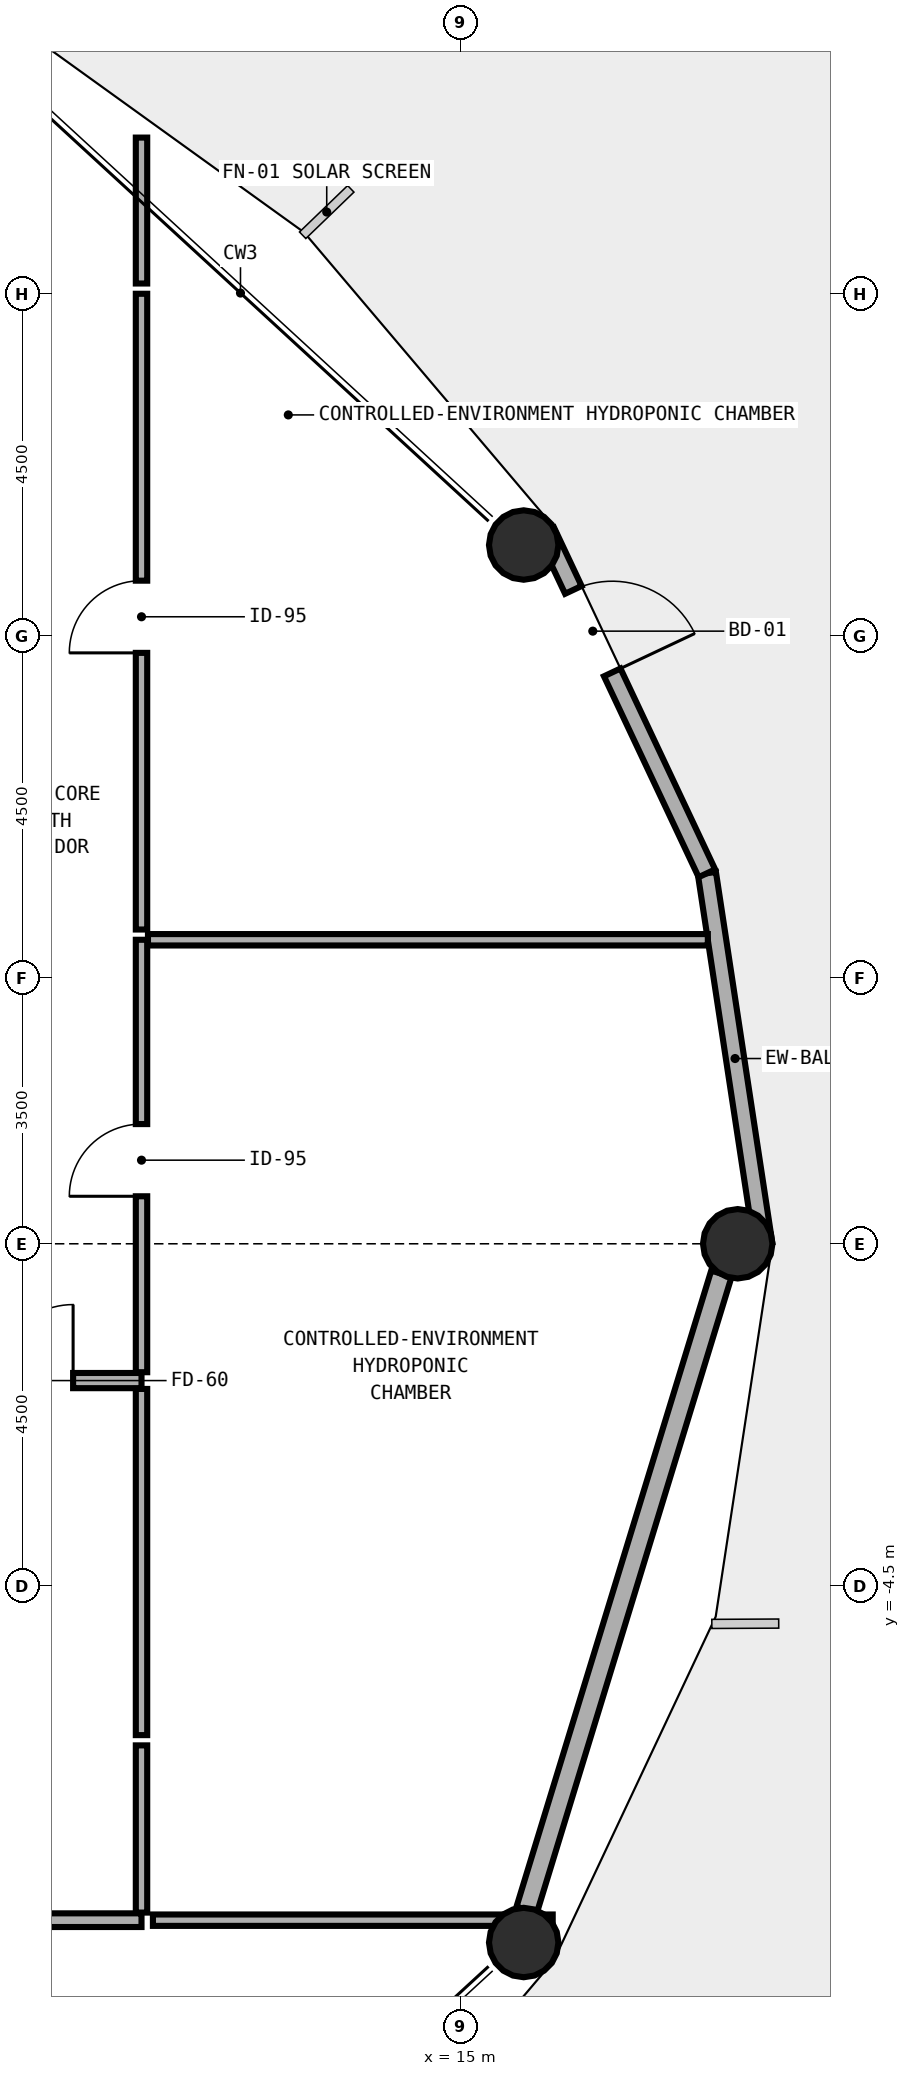
"""IFC4 building model, lengths in metres.
Left out: names, types, materials, properties, quantities, classifications, styles, units other than length and angle.
Written with IfcOpenShell. Run it as: python <this file> out.ifc"""

import sys

from ifc_helpers import new_model, si_unit, direction, frame, frame_2d, origin, origin_2d, place, context, subcontext, project, spatial, rectangle, hollow_circle, extrude, element, fill, save


model = new_model("IFC4")
c1 = context("Model", 3, precision=1e-05, world=origin(), true_north=direction((0.0, 1.0)))
c2 = subcontext(c1, "Body", "Model", "MODEL_VIEW")
j1 = project(units=[si_unit("LENGTHUNIT", "METRE"), si_unit("PLANEANGLEUNIT", "RADIAN")], contexts=[c1])
p1 = place(None, origin())
s1 = spatial("IfcSite", under=j1, at=p1, CompositionType="ELEMENT")
p2 = place(p1, origin())
s2 = spatial("IfcBuilding", under=s1, at=p2, CompositionType="ELEMENT")
p3 = place(p2, frame((0.0, 0.0, 27.6)))
s3 = spatial("IfcBuildingStorey", under=s2, at=p3, CompositionType="ELEMENT", Elevation=27.6)
p4 = place(p3, frame((18.55, 0.0, 0.0), z_axis=(0.048456117097, 0.0, 0.998825312412), x_axis=(0.0, 1.0, 0.0)))
e1 = element("IfcColumn", 1, at=p4, inside=s3, PredefinedType="COLUMN", context=c2, shape_type="SweptSolid", body=[
    extrude(hollow_circle(Radius=0.457, WallThickness=0.032, at=origin_2d()), origin(), (0.0, 0.0, 1.0), 3.88),
])
for number, where, z_axis, x_axis in (
    (2, (15.747, 9.157, 0.0), (0.042, 0.019, 0.999), (-0.409, 0.913, 0.0)),
    (3, (15.747, -9.157, 0.0), (0.042, -0.019, 0.999), (0.409, 0.913, 0.0)),
):
    element("IfcColumn", number, at=place(p3, frame(where, z_axis=z_axis, x_axis=x_axis)), inside=s3, PredefinedType="COLUMN", context=c2, shape_type="SweptSolid", body=[
        extrude(hollow_circle(Radius=0.457, WallThickness=0.032, at=origin_2d()), origin(), (0.0, 0.0, 1.0), 3.879),
    ])
p5 = place(p3, frame((18.239, 4.875, 0.0), z_axis=(0.0, 0.0, 1.0), x_axis=(0.150315759556, -0.988638039137, 0.0)))
e4 = element("IfcWall", 4, at=p5, inside=s3, PredefinedType="SOLIDWALL", context=c2, shape_type="SweptSolid", body=[
    extrude(rectangle(XDim=4.931, YDim=0.24, at=frame_2d((2.465, 0.0))), origin(), (0.0, 0.0, 1.0), 3.06),
])
p6 = place(p3, frame((16.119, 9.373, 0.0), z_axis=(0.0, 0.0, 1.0), x_axis=(0.426272299263, -0.904594896559, 0.0)))
e5 = element("IfcWall", 5, at=p6, inside=s3, PredefinedType="SOLIDWALL", context=c2, shape_type="SweptSolid", body=[
    extrude(rectangle(XDim=4.972, YDim=0.24, at=frame_2d((2.486, 0.0))), origin(), (0.0, 0.0, 1.0), 3.06),
])
p7 = place(p6, frame((0.85, 0.0, 0.0)))
e6 = element("IfcOpeningElement", 6, at=p7, cuts=e5, PredefinedType="OPENING", context=c2, shape_type="SweptSolid", body=[
    extrude(rectangle(XDim=1.2, YDim=2.2, at=frame_2d((0.6, 1.1))), frame((0.0, 0.13, 0.0), z_axis=(0.0, -1.0, 0.0), x_axis=(1.0, 0.0, 0.0)), (0.0, 0.0, 1.0), 0.26),
])
p8 = place(p3, frame((18.429, -0.394, 0.0), z_axis=(0.0, 0.0, 1.0), x_axis=(-0.292709587844, -0.956201389449, 0.0)))
e7 = element("IfcWall", 7, at=p8, inside=s3, PredefinedType="SOLIDWALL", context=c2, shape_type="SweptSolid", body=[
    extrude(rectangle(XDim=8.753, YDim=0.28, at=frame_2d((4.376, 0.0))), origin(), (0.0, 0.0, 1.0), 3.06),
])
p9 = place(p3, frame((8.16, -1.8, 0.0), z_axis=(0.0, 0.0, 1.0), x_axis=(1.0, 0.0, 0.0)))
e8 = element("IfcWall", 8, at=p9, inside=s3, PredefinedType="MOVABLE", context=c2, shape_type="SweptSolid", body=[
    extrude(rectangle(XDim=2.64, YDim=0.2, at=frame_2d((1.32, 0.0))), origin(), (0.0, 0.0, 1.0), 3.64),
])
p10 = place(p9, frame((0.74, 0.0, 0.0)))
e9 = element("IfcOpeningElement", 9, at=p10, cuts=e8, PredefinedType="OPENING", context=c2, shape_type="SweptSolid", body=[
    extrude(rectangle(XDim=1.0, YDim=2.1, at=frame_2d((0.5, 1.05))), frame((0.0, 0.11, 0.0), z_axis=(0.0, -1.0, 0.0), x_axis=(1.0, 0.0, 0.0)), (0.0, 0.0, 1.0), 0.22),
])
p11 = place(p3, frame((10.8, -1.69, 0.0), z_axis=(0.0, 0.0, 1.0), x_axis=(0.0, 1.0, 0.0)))
e10 = element("IfcWall", 10, at=p11, inside=s3, PredefinedType="PARTITIONING", context=c2, shape_type="SweptSolid", body=[
    extrude(rectangle(XDim=5.69, YDim=0.15, at=frame_2d((2.845, 0.0))), origin(), (0.0, 0.0, 1.0), 3.64),
])
p12 = place(p11, frame((2.315, 0.0, 0.0)))
e11 = element("IfcOpeningElement", 11, at=p12, cuts=e10, PredefinedType="OPENING", context=c2, shape_type="SweptSolid", body=[
    extrude(rectangle(XDim=0.95, YDim=2.1, at=frame_2d((0.475, 1.05))), frame((0.0, 0.085, 0.0), z_axis=(0.0, -1.0, 0.0), x_axis=(1.0, 0.0, 0.0)), (0.0, 0.0, 1.0), 0.17),
])
p13 = place(p3, frame((10.8, 4.135, 0.0), z_axis=(0.0, 0.0, 1.0), x_axis=(0.0, 1.0, 0.0)))
e12 = element("IfcWall", 12, at=p13, inside=s3, PredefinedType="PARTITIONING", context=c2, shape_type="SweptSolid", body=[
    extrude(rectangle(XDim=8.365, YDim=0.15, at=frame_2d((4.183, 0.0))), origin(), (0.0, 0.0, 1.0), 3.64),
])
p14 = place(p13, frame((3.64, 0.0, 0.0)))
e13 = element("IfcOpeningElement", 13, at=p14, cuts=e12, PredefinedType="OPENING", context=c2, shape_type="SweptSolid", body=[
    extrude(rectangle(XDim=0.95, YDim=2.1, at=frame_2d((0.475, 1.05))), frame((0.0, 0.085, 0.0), z_axis=(0.0, -1.0, 0.0), x_axis=(1.0, 0.0, 0.0)), (0.0, 0.0, 1.0), 0.17),
])
p15 = place(p3, frame((8.15, -8.9, 0.0), z_axis=(0.0, 0.0, 1.0), x_axis=(1.0, 0.0, 0.0)))
e14 = element("IfcWall", 14, at=p15, inside=s3, PredefinedType="PLUMBINGWALL", context=c2, shape_type="SweptSolid", body=[
    extrude(rectangle(XDim=2.65, YDim=0.18, at=frame_2d((1.325, 0.0))), origin(), (0.0, 0.0, 1.0), 3.64),
])
p16 = place(p3, frame((10.95, -8.9, 0.0), z_axis=(0.0, 0.0, 1.0), x_axis=(1.0, 0.0, 0.0)))
e15 = element("IfcWall", 15, at=p16, inside=s3, PredefinedType="PARTITIONING", context=c2, shape_type="SweptSolid", body=[
    extrude(rectangle(XDim=5.26, YDim=0.15, at=frame_2d((2.63, 0.0))), origin(), (0.0, 0.0, 1.0), 2.972),
])
p17 = place(p3, frame((10.8, -8.8, 0.0), z_axis=(0.0, 0.0, 1.0), x_axis=(0.0, 1.0, 0.0)))
e16 = element("IfcWall", 16, at=p17, inside=s3, PredefinedType="PARTITIONING", context=c2, shape_type="SweptSolid", body=[
    extrude(rectangle(XDim=2.2, YDim=0.15, at=frame_2d((1.1, 0.0))), origin(), (0.0, 0.0, 1.0), 3.64),
])
p18 = place(p3, frame((10.8, -6.465, 0.0), z_axis=(0.0, 0.0, 1.0), x_axis=(0.0, 1.0, 0.0)))
e17 = element("IfcWall", 17, at=p18, inside=s3, PredefinedType="PARTITIONING", context=c2, shape_type="SweptSolid", body=[
    extrude(rectangle(XDim=4.555, YDim=0.15, at=frame_2d((2.278, 0.0))), origin(), (0.0, 0.0, 1.0), 3.64),
])
p19 = place(p3, frame((10.885, 4.0, 0.0), z_axis=(0.0, 0.0, 1.0), x_axis=(1.0, 0.0, 0.0)))
e18 = element("IfcWall", 18, at=p19, inside=s3, PredefinedType="PARTITIONING", context=c2, shape_type="SweptSolid", body=[
    extrude(rectangle(XDim=7.366, YDim=0.15, at=frame_2d((3.683, 0.0))), origin(), (0.0, 0.0, 1.0), 3.64),
])
p20 = place(p3, frame((10.8, 12.635, 0.0), z_axis=(0.0, 0.0, 1.0), x_axis=(0.0, 1.0, 0.0)))
e19 = element("IfcWall", 19, at=p20, inside=s3, PredefinedType="PARTITIONING", context=c2, shape_type="SweptSolid", body=[
    extrude(rectangle(XDim=1.92, YDim=0.15, at=frame_2d((0.96, 0.0))), origin(), (0.0, 0.0, 1.0), 3.64),
])
p21 = place(p7, origin())
e20 = element("IfcDoor", 20, at=p21, inside=s3, OperationType="SINGLE_SWING_RIGHT", PredefinedType="DOOR", context=c2, shape_type="SweptSolid", body=[
    extrude(rectangle(XDim=1.2, YDim=2.2, at=frame_2d((0.6, 1.1))), frame((0.0, 0.025, 0.0), z_axis=(0.0, -1.0, 0.0), x_axis=(1.0, 0.0, 0.0)), (0.0, 0.0, 1.0), 0.05),
])
fill(e6, e20)
p22 = place(p10, origin())
e21 = element("IfcDoor", 21, at=p22, inside=s3, OperationType="SINGLE_SWING_RIGHT", PredefinedType="DOOR", context=c2, shape_type="SweptSolid", body=[
    extrude(rectangle(XDim=1.0, YDim=2.1, at=frame_2d((0.5, 1.05))), frame((0.0, 0.025, 0.0), z_axis=(0.0, -1.0, 0.0), x_axis=(1.0, 0.0, 0.0)), (0.0, 0.0, 1.0), 0.05),
])
fill(e9, e21)
p23 = place(p12, origin())
e22 = element("IfcDoor", 22, at=p23, inside=s3, OperationType="SINGLE_SWING_LEFT", PredefinedType="DOOR", context=c2, shape_type="SweptSolid", body=[
    extrude(rectangle(XDim=0.95, YDim=2.1, at=frame_2d((0.475, 1.05))), frame((0.0, 0.025, 0.0), z_axis=(0.0, -1.0, 0.0), x_axis=(1.0, 0.0, 0.0)), (0.0, 0.0, 1.0), 0.05),
])
fill(e11, e22)
p24 = place(p14, origin())
e23 = element("IfcDoor", 23, at=p24, inside=s3, OperationType="SINGLE_SWING_LEFT", PredefinedType="DOOR", context=c2, shape_type="SweptSolid", body=[
    extrude(rectangle(XDim=0.95, YDim=2.1, at=frame_2d((0.475, 1.05))), frame((0.0, 0.025, 0.0), z_axis=(0.0, -1.0, 0.0), x_axis=(1.0, 0.0, 0.0)), (0.0, 0.0, 1.0), 0.05),
])
fill(e13, e23)
save(model, sys.argv[1])
